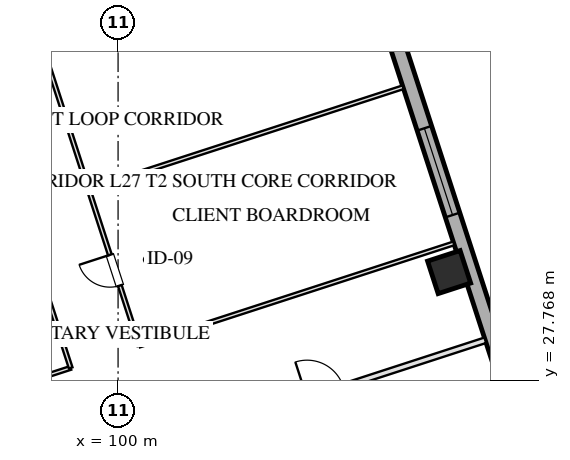
"""IFC4 building model, lengths in metres.
Left out: names, types, materials, properties, quantities, classifications, styles, units other than length and angle.
Written with IfcOpenShell. Run it as: python <this file> out.ifc"""

import sys

from ifc_helpers import new_model, si_unit, direction, frame, frame_2d, origin, origin_2d, place, context, subcontext, project, spatial, rectangle, hollow_rectangle, extrude, element, fill, save


model = new_model("IFC4")
c1 = context("Model", 3, precision=1e-05, world=origin(), true_north=direction((0.0, 1.0)))
c2 = subcontext(c1, "Body", "Model", "MODEL_VIEW")
j1 = project(units=[si_unit("LENGTHUNIT", "METRE"), si_unit("PLANEANGLEUNIT", "RADIAN")], contexts=[c1])
p1 = place(None, origin())
s1 = spatial("IfcSite", under=j1, at=p1, CompositionType="ELEMENT")
p2 = place(p1, origin())
s2 = spatial("IfcBuilding", under=s1, at=p2, CompositionType="ELEMENT")
p3 = place(p2, frame((0.0, 0.0, 106.95)))
s3 = spatial("IfcBuildingStorey", under=s2, at=p3, CompositionType="ELEMENT", Elevation=106.95)
p4 = place(p3, frame((108.711, 30.616, 0.0), z_axis=(0.0, 0.0, 1.0), x_axis=(0.951056516295, 0.309016994375, 0.0)))
e1 = element("IfcColumn", 1, at=p4, inside=s3, PredefinedType="COLUMN", context=c2, shape_type="SweptSolid", body=[
    extrude(hollow_rectangle(XDim=0.9, YDim=0.9, WallThickness=0.032, at=origin_2d()), origin(), (0.0, 0.0, 1.0), 3.451),
])
p5 = place(p3, frame((99.284, 61.41, 0.0), z_axis=(0.0, 0.0, 1.0), x_axis=(0.309017542002, -0.95105633836, 0.0)))
e2 = element("IfcWall", 2, at=p5, inside=s3, PredefinedType="SOLIDWALL", context=c2, shape_type="SweptSolid", body=[
    extrude(rectangle(XDim=46.4, YDim=0.4, at=frame_2d((23.2, 0.0))), origin(), (0.0, 0.0, 1.0), 2.61),
])
p6 = place(p5, frame((28.4, 0.0, 0.75)))
e3 = element("IfcOpeningElement", 3, at=p6, cuts=e2, PredefinedType="OPENING", context=c2, shape_type="SweptSolid", body=[
    extrude(rectangle(XDim=2.4, YDim=1.46, at=frame_2d((1.2, 0.73))), frame((0.0, 0.21, 0.0), z_axis=(0.0, -1.0, 0.0), x_axis=(1.0, 0.0, 0.0)), (0.0, 0.0, 1.0), 0.42),
])
p7 = place(p5, frame((15.6, 0.0, 0.75)))
e4 = element("IfcOpeningElement", 4, at=p7, cuts=e2, PredefinedType="OPENING", context=c2, shape_type="SweptSolid", body=[
    extrude(rectangle(XDim=2.4, YDim=1.46, at=frame_2d((1.2, 0.73))), frame((0.0, 0.21, 0.0), z_axis=(0.0, -1.0, 0.0), x_axis=(1.0, 0.0, 0.0)), (0.0, 0.0, 1.0), 0.42),
])
p8 = place(p3, frame((101.578, 26.196, 0.0), z_axis=(0.0, 0.0, 1.0), x_axis=(0.951062770994, 0.308997743729, 0.0)))
e5 = element("IfcWall", 5, at=p8, inside=s3, PredefinedType="PARTITIONING", context=c2, shape_type="SweptSolid", body=[
    extrude(rectangle(XDim=8.5, YDim=0.15, at=frame_2d((4.25, 0.0))), origin(), (0.0, 0.0, 1.0), 3.175),
])
p9 = place(p8, frame((3.57, 0.0, 0.0)))
e6 = element("IfcOpeningElement", 6, at=p9, cuts=e5, PredefinedType="OPENING", context=c2, shape_type="SweptSolid", body=[
    extrude(rectangle(XDim=1.0, YDim=2.05, at=frame_2d((0.5, 1.025))), frame((0.0, 0.085, 0.0), z_axis=(0.0, -1.0, 0.0), x_axis=(1.0, 0.0, 0.0)), (0.0, 0.0, 1.0), 0.17),
])
p10 = place(p3, frame((91.24, 25.655, 0.0), z_axis=(0.0, 0.0, 1.0), x_axis=(0.951060182336, 0.309005711233, 0.0)))
e7 = element("IfcWall", 7, at=p10, inside=s3, PredefinedType="MOVABLE", context=c2, shape_type="SweptSolid", body=[
    extrude(rectangle(XDim=7.9, YDim=0.1, at=frame_2d((3.95, 0.0))), origin(), (0.0, 0.0, 1.0), 3.175),
])
p11 = place(p3, frame((100.56, 28.683, 0.0), z_axis=(0.0, 0.0, 1.0), x_axis=(0.951055307445, 0.309020714809, 0.0)))
e8 = element("IfcWall", 8, at=p11, inside=s3, PredefinedType="MOVABLE", context=c2, shape_type="SweptSolid", body=[
    extrude(rectangle(XDim=8.7, YDim=0.1, at=frame_2d((4.35, 0.0))), origin(), (0.0, 0.0, 1.0), 3.175),
])
p12 = place(p3, frame((98.753, 28.096, 0.0), z_axis=(0.0, 0.0, 1.0), x_axis=(-0.30901773025, 0.951056277195, 0.0)))
e9 = element("IfcWall", 9, at=p12, inside=s3, PredefinedType="MOVABLE", context=c2, shape_type="SweptSolid", body=[
    extrude(rectangle(XDim=16.64, YDim=0.1, at=frame_2d((8.32, 0.0))), origin(), (0.0, 0.0, 1.0), 3.175),
])
p13 = place(p3, frame((100.56, 28.683, 0.0), z_axis=(0.0, 0.0, 1.0), x_axis=(-0.309004459387, 0.951060589068, 0.0)))
e10 = element("IfcWall", 10, at=p13, inside=s3, PredefinedType="MOVABLE", context=c2, shape_type="SweptSolid", body=[
    extrude(rectangle(XDim=16.64, YDim=0.1, at=frame_2d((8.32, 0.0))), origin(), (0.0, 0.0, 1.0), 3.175),
])
p14 = place(p13, frame((1.66, 0.0, 0.0)))
e11 = element("IfcOpeningElement", 11, at=p14, cuts=e10, PredefinedType="OPENING", context=c2, shape_type="SweptSolid", body=[
    extrude(rectangle(XDim=0.85, YDim=2.05, at=frame_2d((0.425, 1.025))), frame((0.0, 0.06, 0.0), z_axis=(0.0, -1.0, 0.0), x_axis=(1.0, 0.0, 0.0)), (0.0, 0.0, 1.0), 0.12),
])
p15 = place(p13, frame((7.82, 0.0, 0.0)))
e12 = element("IfcOpeningElement", 12, at=p15, cuts=e10, PredefinedType="OPENING", context=c2, shape_type="SweptSolid", body=[
    extrude(rectangle(XDim=1.05, YDim=2.05, at=frame_2d((0.525, 1.025))), frame((0.0, 0.06, 0.0), z_axis=(0.0, -1.0, 0.0), x_axis=(1.0, 0.0, 0.0)), (0.0, 0.0, 1.0), 0.12),
])
p16 = place(p13, frame((13.98, 0.0, 0.0)))
e13 = element("IfcOpeningElement", 13, at=p16, cuts=e10, PredefinedType="OPENING", context=c2, shape_type="SweptSolid", body=[
    extrude(rectangle(XDim=1.0, YDim=2.05, at=frame_2d((0.5, 1.025))), frame((0.0, 0.06, 0.0), z_axis=(0.0, -1.0, 0.0), x_axis=(1.0, 0.0, 0.0)), (0.0, 0.0, 1.0), 0.12),
])
p17 = place(p3, frame((99.225, 32.792, 0.0), z_axis=(0.0, 0.0, 1.0), x_axis=(0.951055307445, 0.309020714809, 0.0)))
e14 = element("IfcWall", 14, at=p17, inside=s3, PredefinedType="MOVABLE", context=c2, shape_type="SweptSolid", body=[
    extrude(rectangle(XDim=8.7, YDim=0.1, at=frame_2d((4.35, 0.0))), origin(), (0.0, 0.0, 1.0), 3.175),
])
p18 = place(p6, origin())
e15 = element("IfcWindow", 15, at=p18, inside=s3, PartitioningType="TRIPLE_PANEL_VERTICAL", PredefinedType="WINDOW", context=c2, shape_type="SweptSolid", body=[
    extrude(rectangle(XDim=2.4, YDim=1.46, at=frame_2d((1.2, 0.73))), frame((0.0, 0.03, 0.0), z_axis=(0.0, -1.0, 0.0), x_axis=(1.0, 0.0, 0.0)), (0.0, 0.0, 1.0), 0.06),
])
fill(e3, e15)
p19 = place(p14, origin())
e16 = element("IfcDoor", 16, at=p19, inside=s3, OperationType="SINGLE_SWING_RIGHT", PredefinedType="DOOR", context=c2, shape_type="SweptSolid", body=[
    extrude(rectangle(XDim=0.85, YDim=2.05, at=frame_2d((0.425, 1.025))), frame((0.0, 0.025, 0.0), z_axis=(0.0, -1.0, 0.0), x_axis=(1.0, 0.0, 0.0)), (0.0, 0.0, 1.0), 0.05),
])
fill(e11, e16)
save(model, sys.argv[1])
